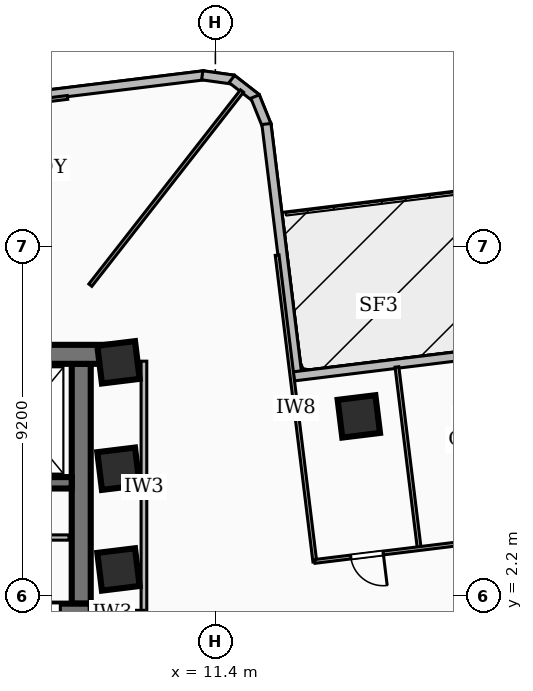
"""IFC4 building model, lengths in metres.
Left out: names, types, materials, properties, quantities, classifications, styles, units other than length and angle.
Written with IfcOpenShell. Run it as: python <this file> out.ifc"""

import sys

from ifc_helpers import new_model, si_unit, direction, frame, frame_2d, origin, origin_2d, place, context, subcontext, project, spatial, rectangle, extrude, element, fill, save


model = new_model("IFC4")
c1 = context("Model", 3, precision=1e-05, world=origin(), true_north=direction((0.0, 1.0)))
c2 = subcontext(c1, "Body", "Model", "MODEL_VIEW")
j1 = project(units=[si_unit("LENGTHUNIT", "METRE"), si_unit("PLANEANGLEUNIT", "RADIAN")], contexts=[c1])
p1 = place(None, origin())
s1 = spatial("IfcSite", under=j1, at=p1, CompositionType="ELEMENT")
p2 = place(p1, origin())
s2 = spatial("IfcBuilding", under=s1, at=p2, CompositionType="ELEMENT")
p3 = place(p2, frame((0.0, 0.0, 82.08)))
s3 = spatial("IfcBuildingStorey", under=s2, at=p3, CompositionType="ELEMENT", Elevation=82.08)
p4 = place(p3, frame((-8.78, 8.56, 0.0), z_axis=(0.0, 0.0, 1.0), x_axis=(1.0, 0.0, 0.0)))
e1 = element("IfcWall", 1, at=p4, inside=s3, PredefinedType="SHEAR", context=c2, shape_type="SweptSolid", body=[
    extrude(rectangle(XDim=17.56, YDim=0.5, at=frame_2d((8.78, 0.0))), origin(), (0.0, 0.0, 1.0), 3.34),
])
p5 = place(p3, frame((8.12, 1.75, 0.0), z_axis=(0.0, 0.0, 1.0), x_axis=(-1.0, 0.0, 0.0)))
e2 = element("IfcWall", 2, at=p5, inside=s3, PredefinedType="SHEAR", context=c2, shape_type="SweptSolid", body=[
    extrude(rectangle(XDim=16.24, YDim=0.5, at=frame_2d((8.12, 0.0))), origin(), (0.0, 0.0, 1.0), 3.34),
])
p6 = place(p5, frame((7.45, 0.0, 0.0)))
e3 = element("IfcOpeningElement", 3, at=p6, cuts=e2, PredefinedType="OPENING", context=c2, shape_type="SweptSolid", body=[
    extrude(rectangle(XDim=1.0, YDim=2.1, at=frame_2d((0.5, 1.05))), frame((0.0, 0.26, 0.0), z_axis=(0.0, -1.0, 0.0), x_axis=(1.0, 0.0, 0.0)), (0.0, 0.0, 1.0), 0.52),
])
p7 = place(p5, frame((3.85, 0.0, 0.0)))
e4 = element("IfcOpeningElement", 4, at=p7, cuts=e2, PredefinedType="OPENING", context=c2, shape_type="SweptSolid", body=[
    extrude(rectangle(XDim=0.9, YDim=2.06, at=frame_2d((0.45, 1.03))), frame((0.0, 0.26, 0.0), z_axis=(0.0, -1.0, 0.0), x_axis=(1.0, 0.0, 0.0)), (0.0, 0.0, 1.0), 0.52),
])
p8 = place(p5, frame((2.35, 0.0, 0.0)))
e5 = element("IfcOpeningElement", 5, at=p8, cuts=e2, PredefinedType="OPENING", context=c2, shape_type="SweptSolid", body=[
    extrude(rectangle(XDim=0.9, YDim=2.06, at=frame_2d((0.45, 1.03))), frame((0.0, 0.26, 0.0), z_axis=(0.0, -1.0, 0.0), x_axis=(1.0, 0.0, 0.0)), (0.0, 0.0, 1.0), 0.52),
])
p9 = place(p5, frame((0.8, 0.0, 0.0)))
e6 = element("IfcOpeningElement", 6, at=p9, cuts=e2, PredefinedType="OPENING", context=c2, shape_type="SweptSolid", body=[
    extrude(rectangle(XDim=0.9, YDim=2.06, at=frame_2d((0.45, 1.03))), frame((0.0, 0.26, 0.0), z_axis=(0.0, -1.0, 0.0), x_axis=(1.0, 0.0, 0.0)), (0.0, 0.0, 1.0), 0.52),
])
p10 = place(p3, frame((7.87, 8.31, 0.0), z_axis=(0.0, 0.0, 1.0), x_axis=(0.0, -1.0, 0.0)))
e7 = element("IfcWall", 7, at=p10, inside=s3, PredefinedType="SHEAR", context=c2, shape_type="SweptSolid", body=[
    extrude(rectangle(XDim=6.31, YDim=0.5, at=frame_2d((3.155, 0.0))), origin(), (0.0, 0.0, 1.0), 3.34),
])
p11 = place(p3, frame((7.62, 5.18, 0.0), z_axis=(0.0, 0.0, 1.0), x_axis=(-1.0, 0.0, 0.0)))
e8 = element("IfcWall", 8, at=p11, inside=s3, PredefinedType="SOLIDWALL", context=c2, shape_type="SweptSolid", body=[
    extrude(rectangle(XDim=15.24, YDim=0.3, at=frame_2d((7.62, 0.0))), origin(), (0.0, 0.0, 1.0), 3.34),
])
p12 = place(p11, frame((5.77, 0.0, 0.0)))
e9 = element("IfcOpeningElement", 9, at=p12, cuts=e8, PredefinedType="OPENING", context=c2, shape_type="SweptSolid", body=[
    extrude(rectangle(XDim=1.1, YDim=2.15, at=frame_2d((0.55, 1.075))), frame((0.0, 0.16, 0.0), z_axis=(0.0, -1.0, 0.0), x_axis=(1.0, 0.0, 0.0)), (0.0, 0.0, 1.0), 0.32),
])
p13 = place(p11, frame((2.97, 0.0, 0.0)))
e10 = element("IfcOpeningElement", 10, at=p13, cuts=e8, PredefinedType="OPENING", context=c2, shape_type="SweptSolid", body=[
    extrude(rectangle(XDim=1.1, YDim=2.15, at=frame_2d((0.55, 1.075))), frame((0.0, 0.16, 0.0), z_axis=(0.0, -1.0, 0.0), x_axis=(1.0, 0.0, 0.0)), (0.0, 0.0, 1.0), 0.32),
])
p14 = place(p11, frame((7.97, 0.0, 0.0)))
e11 = element("IfcOpeningElement", 11, at=p14, cuts=e8, PredefinedType="OPENING", context=c2, shape_type="SweptSolid", body=[
    extrude(rectangle(XDim=1.0, YDim=2.1, at=frame_2d((0.5, 1.05))), frame((0.0, 0.16, 0.0), z_axis=(0.0, -1.0, 0.0), x_axis=(1.0, 0.0, 0.0)), (0.0, 0.0, 1.0), 0.32),
])
for number, where, z_axis, x_axis in (
    (12, (8.85, 2.9, 0.0), (0.0, 0.0, 1.0), (0.993, 0.122, 0.0)),
    (13, (8.85, 5.55, 0.0), (0.0, 0.0, 1.0), (0.993, 0.122, 0.0)),
    (14, (8.85, 8.35, 0.0), (0.0, 0.0, 1.0), (0.993, 0.122, 0.0)),
    (15, (15.175, 6.927, 0.0), (0.0, 0.0, 1.0), (0.993, 0.122, 0.0)),
):
    element("IfcColumn", number, at=place(p3, frame(where, z_axis=z_axis, x_axis=x_axis)), inside=s3, PredefinedType="COLUMN", context=c2, shape_type="SweptSolid", body=[
        extrude(rectangle(XDim=1.0, YDim=1.0, at=origin_2d()), origin(), (0.0, 0.0, 1.0), 3.6),
    ])
p15 = place(p3, frame((4.558, 15.098, 0.0), z_axis=(0.0, 0.0, 1.0), x_axis=(0.992537639855, 0.121938646341, 0.0)))
e16 = element("IfcWall", 16, at=p15, inside=s3, PredefinedType="SOLIDWALL", context=c2, shape_type="SweptSolid", body=[
    extrude(rectangle(XDim=6.595, YDim=0.24, at=frame_2d((3.298, 0.0))), origin(), (0.0, 0.0, 1.0), 2.486),
])
p16 = place(p3, frame((11.054, 15.902, 0.0), z_axis=(0.0, 0.0, 1.0), x_axis=(0.990379629694, -0.138376981782, 0.0)))
e17 = element("IfcWall", 17, at=p16, inside=s3, PredefinedType="SOLIDWALL", context=c2, shape_type="SweptSolid", body=[
    extrude(rectangle(XDim=0.831, YDim=0.24, at=frame_2d((0.416, 0.0))), origin(), (0.0, 0.0, 1.0), 3.34),
])
p17 = place(p3, frame((11.832, 15.805, 0.0), z_axis=(0.0, 0.0, 1.0), x_axis=(0.788996702001, -0.614397431824, 0.0)))
e18 = element("IfcWall", 18, at=p17, inside=s3, PredefinedType="SOLIDWALL", context=c2, shape_type="SweptSolid", body=[
    extrude(rectangle(XDim=0.814, YDim=0.24, at=frame_2d((0.407, 0.0))), origin(), (0.0, 0.0, 1.0), 3.34),
])
p18 = place(p3, frame((12.445, 15.343, 0.0), z_axis=(0.0, 0.0, 1.0), x_axis=(0.37326634174, -0.927724225254, 0.0)))
e19 = element("IfcWall", 19, at=p18, inside=s3, PredefinedType="SOLIDWALL", context=c2, shape_type="SweptSolid", body=[
    extrude(rectangle(XDim=0.83, YDim=0.24, at=frame_2d((0.415, 0.0))), origin(), (0.0, 0.0, 1.0), 3.34),
])
p19 = place(p3, frame((12.743, 14.621, 0.0), z_axis=(0.0, 0.0, 1.0), x_axis=(0.121949848087, -0.992536263595, 0.0)))
e20 = element("IfcWall", 20, at=p19, inside=s3, PredefinedType="SOLIDWALL", context=c2, shape_type="SweptSolid", body=[
    extrude(rectangle(XDim=6.775, YDim=0.24, at=frame_2d((3.387, 0.0))), origin(), (0.0, 0.0, 1.0), 3.34),
])
p20 = place(p3, frame((13.462, 7.98, 0.0), z_axis=(0.0, 0.0, 1.0), x_axis=(0.992550299081, 0.121835560463, 0.0)))
e21 = element("IfcWall", 21, at=p20, inside=s3, PredefinedType="SOLIDWALL", context=c2, shape_type="SweptSolid", body=[
    extrude(rectangle(XDim=16.275, YDim=0.24, at=frame_2d((8.138, 0.0))), origin(), (0.0, 0.0, 1.0), 3.34),
])
p21 = place(p20, frame((4.4, 0.0, 0.0)))
e22 = element("IfcOpeningElement", 22, at=p21, cuts=e21, PredefinedType="OPENING", context=c2, shape_type="SweptSolid", body=[
    extrude(rectangle(XDim=1.1, YDim=2.1, at=frame_2d((0.55, 1.05))), frame((0.0, 0.13, 0.0), z_axis=(0.0, -1.0, 0.0), x_axis=(1.0, 0.0, 0.0)), (0.0, 0.0, 1.0), 0.26),
])
p22 = place(p3, frame((2.9, 3.74, 0.0), z_axis=(0.0, 0.0, 1.0), x_axis=(1.0, 0.0, 0.0)))
e23 = element("IfcWall", 23, at=p22, inside=s3, PredefinedType="PARTITIONING", context=c2, shape_type="SweptSolid", body=[
    extrude(rectangle(XDim=4.65, YDim=0.138, at=frame_2d((2.325, 0.0))), origin(), (0.0, 0.0, 1.0), 3.34),
])
p23 = place(p3, frame((9.52, 1.75, 0.0), z_axis=(0.0, 0.0, 1.0), x_axis=(0.0, 1.0, 0.0)))
e24 = element("IfcWall", 24, at=p23, inside=s3, PredefinedType="PARTITIONING", context=c2, shape_type="SweptSolid", body=[
    extrude(rectangle(XDim=6.63, YDim=0.15, at=frame_2d((3.315, 0.0))), origin(), (0.0, 0.0, 1.0), 2.486),
])
p24 = place(p3, frame((7.85, 1.75, 0.0), z_axis=(0.0, 0.0, 1.0), x_axis=(1.0, 0.0, 0.0)))
e25 = element("IfcWall", 25, at=p24, inside=s3, PredefinedType="PARTITIONING", context=c2, shape_type="SweptSolid", body=[
    extrude(rectangle(XDim=1.67, YDim=0.15, at=frame_2d((0.835, 0.0))), origin(), (0.0, 0.0, 1.0), 2.405),
])
p25 = place(p3, frame((8.11, 10.38, 0.0), z_axis=(0.0, 0.0, 1.0), x_axis=(0.615665236773, 0.788007814828, 0.0)))
e26 = element("IfcWall", 26, at=p25, inside=s3, PredefinedType="PARTITIONING", context=c2, shape_type="SweptSolid", body=[
    extrude(rectangle(XDim=6.482, YDim=0.1, at=frame_2d((3.241, 0.0))), origin(), (0.0, 0.0, 1.0), 3.34),
])
p26 = place(p3, frame((14.017, 3.101, 0.0), z_axis=(0.0, 0.0, 1.0), x_axis=(-0.122045971517, 0.992524448483, 0.0)))
e27 = element("IfcWall", 27, at=p26, inside=s3, PredefinedType="PARTITIONING", context=c2, shape_type="SweptSolid", body=[
    extrude(rectangle(XDim=8.13, YDim=0.1, at=frame_2d((4.065, 0.0))), origin(), (0.0, 0.0, 1.0), 2.486),
])
p27 = place(p3, frame((16.762, 3.469, 0.0), z_axis=(0.0, 0.0, 1.0), x_axis=(-0.121797137196, 0.992555014783, 0.0)))
e28 = element("IfcWall", 28, at=p27, inside=s3, PredefinedType="PARTITIONING", context=c2, shape_type="SweptSolid", body=[
    extrude(rectangle(XDim=4.795, YDim=0.1, at=frame_2d((2.397, 0.0))), origin(), (0.0, 0.0, 1.0), 2.486),
])
p28 = place(p3, frame((21.866, 4.075, 0.0), z_axis=(0.0, 0.0, 1.0), x_axis=(-0.992548040298, -0.121853960542, 0.0)))
e29 = element("IfcWall", 29, at=p28, inside=s3, PredefinedType="PARTITIONING", context=c2, shape_type="SweptSolid", body=[
    extrude(rectangle(XDim=7.91, YDim=0.1, at=frame_2d((3.955, 0.0))), origin(), (0.0, 0.0, 1.0), 3.34),
])
p29 = place(p28, frame((6.095, 0.0, 0.0)))
e30 = element("IfcOpeningElement", 30, at=p29, cuts=e29, PredefinedType="OPENING", context=c2, shape_type="SweptSolid", body=[
    extrude(rectangle(XDim=0.86, YDim=2.04, at=frame_2d((0.43, 1.02))), frame((0.0, 0.06, 0.0), z_axis=(0.0, -1.0, 0.0), x_axis=(1.0, 0.0, 0.0)), (0.0, 0.0, 1.0), 0.12),
])
p30 = place(p28, frame((2.14, 0.0, 0.0)))
e31 = element("IfcOpeningElement", 31, at=p30, cuts=e29, PredefinedType="OPENING", context=c2, shape_type="SweptSolid", body=[
    extrude(rectangle(XDim=0.86, YDim=2.04, at=frame_2d((0.43, 1.02))), frame((0.0, 0.06, 0.0), z_axis=(0.0, -1.0, 0.0), x_axis=(1.0, 0.0, 0.0)), (0.0, 0.0, 1.0), 0.12),
])
p31 = place(p3, frame((7.509, 15.32, 0.0), z_axis=(0.0, 0.0, 1.0), x_axis=(-0.992529957607, -0.122001160868, 0.0)))
e32 = element("IfcWall", 32, at=p31, inside=s3, PredefinedType="PARTITIONING", context=c2, shape_type="SweptSolid", body=[
    extrude(rectangle(XDim=7.95, YDim=0.1, at=frame_2d((3.975, 0.0))), origin(), (0.0, 0.0, 1.0), 2.486),
])
p32 = place(p29, origin())
e33 = element("IfcDoor", 33, at=p32, inside=s3, OperationType="SINGLE_SWING_LEFT", PredefinedType="DOOR", context=c2, shape_type="SweptSolid", body=[
    extrude(rectangle(XDim=0.86, YDim=2.04, at=frame_2d((0.43, 1.02))), frame((0.0, 0.025, 0.0), z_axis=(0.0, -1.0, 0.0), x_axis=(1.0, 0.0, 0.0)), (0.0, 0.0, 1.0), 0.05),
])
fill(e30, e33)
save(model, sys.argv[1])
